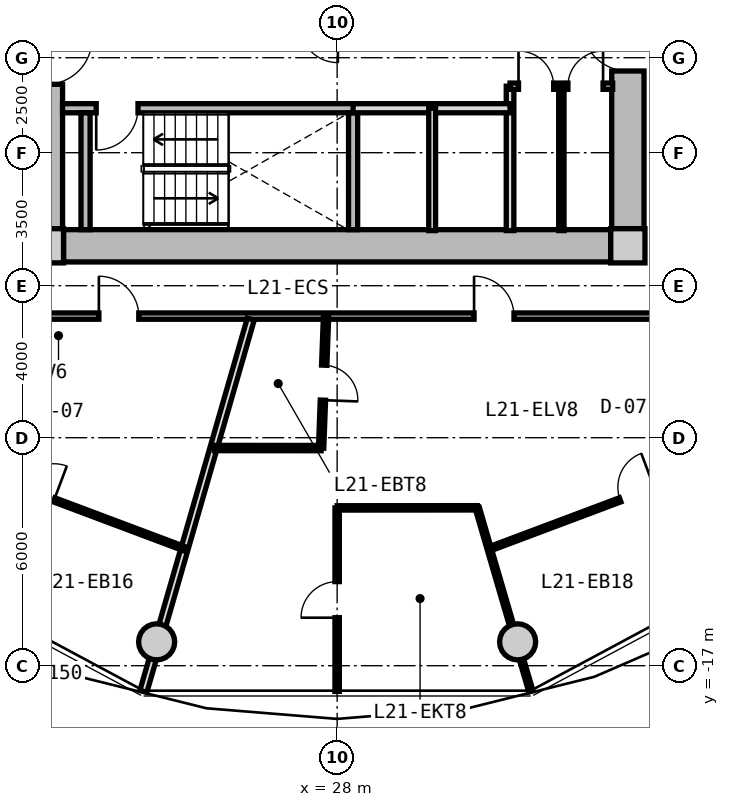
"""IFC4 building model, lengths in metres.
Left out: names, types, materials, properties, quantities, classifications, styles, units other than length and angle.
Written with IfcOpenShell. Run it as: python <this file> out.ifc"""

import sys

from ifc_helpers import new_model, si_unit, direction, frame, frame_2d, origin, origin_2d, place, context, subcontext, project, spatial, rectangle, circle, extrude, source, transform, mapped, element, fill, save


model = new_model("IFC4")
c1 = context("Model", 3, precision=1e-05, world=origin(), true_north=direction((0.0, 1.0)))
c2 = subcontext(c1, "Body", "Model", "MODEL_VIEW")
j1 = project(units=[si_unit("LENGTHUNIT", "METRE"), si_unit("PLANEANGLEUNIT", "RADIAN")], contexts=[c1])
p1 = place(None, origin())
s1 = spatial("IfcSite", under=j1, at=p1, CompositionType="ELEMENT")
p2 = place(p1, origin())
s2 = spatial("IfcBuilding", under=s1, at=p2, CompositionType="ELEMENT")
p3 = place(p2, frame((0.0, 0.0, 70.4)))
s3 = spatial("IfcBuildingStorey", under=s2, at=p3, CompositionType="ELEMENT", Elevation=70.4)
m1 = source(origin(), c2, "Body", "SweptSolid", [
    extrude(rectangle(XDim=0.9, YDim=0.9, at=origin_2d()), origin(), (0.0, 0.0, 1.0), 3.05),
])
for number, where, z_axis, x_axis in (
    (1, (20.35, -5.95, 0.0), (0.0, 0.0, 1.0), (1.0, 0.0, 0.0)),
    (2, (35.65, -5.95, 0.0), (0.0, 0.0, 1.0), (1.0, 0.0, 0.0)),
):
    element("IfcColumn", number, at=place(p3, frame(where, z_axis=z_axis, x_axis=x_axis)), inside=s3, PredefinedType="COLUMN", context=c2, shape_type="MappedRepresentation", body=[
        mapped(m1, transform((0.0, 0.0, 0.0), x_axis=(1.0, 0.0, 0.0), y_axis=(0.0, 1.0, 0.0), z_axis=(0.0, 0.0, 1.0), scale=1.0)),
    ])
m2 = source(origin(), c2, "Body", "SweptSolid", [
    extrude(rectangle(XDim=14.4, YDim=0.85, at=frame_2d((7.2, 0.0))), origin(), (0.0, 0.0, 1.0), 2.73),
])
p4 = place(p3, frame((35.2, -5.95, 0.0), z_axis=(0.0, 0.0, 1.0), x_axis=(-1.0, 0.0, 0.0)))
e3 = element("IfcWall", 3, at=p4, inside=s3, PredefinedType="SHEAR", context=c2, shape_type="MappedRepresentation", body=[
    mapped(m2, transform((0.0, 0.0, 0.0), x_axis=(1.0, 0.0, 0.0), y_axis=(0.0, 1.0, 0.0), z_axis=(0.0, 0.0, 1.0), scale=1.0)),
])
m3 = source(origin(), c2, "Body", "SweptSolid", [
    extrude(rectangle(XDim=11.0, YDim=0.85, at=frame_2d((5.5, 0.0))), origin(), (0.0, 0.0, 1.0), 2.73),
])
p5 = place(p3, frame((20.35, -5.5, 0.0), z_axis=(0.0, 0.0, 1.0), x_axis=(0.0, 1.0, 0.0)))
e4 = element("IfcWall", 4, at=p5, inside=s3, PredefinedType="SHEAR", context=c2, shape_type="MappedRepresentation", body=[
    mapped(m3, transform((0.0, 0.0, 0.0), x_axis=(1.0, 0.0, 0.0), y_axis=(0.0, 1.0, 0.0), z_axis=(0.0, 0.0, 1.0), scale=1.0)),
])
p6 = place(p5, frame((3.8, 0.0, 0.0)))
e5 = element("IfcOpeningElement", 5, at=p6, cuts=e4, PredefinedType="OPENING", context=c2, shape_type="SweptSolid", body=[
    extrude(rectangle(XDim=1.2, YDim=2.15, at=frame_2d((0.6, 1.075))), frame((0.0, 0.435, 0.0), z_axis=(0.0, -1.0, 0.0), x_axis=(1.0, 0.0, 0.0)), (0.0, 0.0, 1.0), 0.87),
])
p7 = place(p3, frame((35.65, 5.5, 0.0), z_axis=(0.0, 0.0, 1.0), x_axis=(0.0, -1.0, 0.0)))
e6 = element("IfcWall", 6, at=p7, inside=s3, PredefinedType="SHEAR", context=c2, shape_type="MappedRepresentation", body=[
    mapped(m3, transform((0.0, 0.0, 0.0), x_axis=(1.0, 0.0, 0.0), y_axis=(0.0, 1.0, 0.0), z_axis=(0.0, 0.0, 1.0), scale=1.0)),
])
p8 = place(p7, frame((5.65, 0.0, 0.0)))
e7 = element("IfcOpeningElement", 7, at=p8, cuts=e6, PredefinedType="OPENING", context=c2, shape_type="SweptSolid", body=[
    extrude(rectangle(XDim=1.2, YDim=2.15, at=frame_2d((0.6, 1.075))), frame((0.0, 0.435, 0.0), z_axis=(0.0, -1.0, 0.0), x_axis=(1.0, 0.0, 0.0)), (0.0, 0.0, 1.0), 0.87),
])
m4 = source(origin(), c2, "Body", "SweptSolid", [
    extrude(circle(Radius=0.475, at=origin_2d()), origin(), (0.0, 0.0, 1.0), 3.05),
])
for number, where, z_axis, x_axis in (
    (8, (23.251, -16.373, 0.0), (0.0, 0.0, 1.0), (1.0, 0.0, 0.0)),
    (9, (32.749, -16.373, 0.0), (0.0, 0.0, 1.0), (1.0, 0.0, 0.0)),
):
    element("IfcColumn", number, at=place(p3, frame(where, z_axis=z_axis, x_axis=x_axis)), inside=s3, PredefinedType="COLUMN", context=c2, shape_type="MappedRepresentation", body=[
        mapped(m4, transform((0.0, 0.0, 0.0), x_axis=(1.0, 0.0, 0.0), y_axis=(0.0, 1.0, 0.0), z_axis=(0.0, 0.0, 1.0), scale=1.0)),
    ])
m5 = source(origin(), c2, "Body", "SweptSolid", [
    extrude(rectangle(XDim=7.765, YDim=0.24, at=frame_2d((3.883, 0.0))), origin(), (0.0, 0.0, 1.0), 2.73),
])
p9 = place(p3, frame((20.775, -2.33, 0.0), z_axis=(0.0, 0.0, 1.0), x_axis=(1.0, 0.0, 0.0)))
e10 = element("IfcWall", 10, at=p9, inside=s3, PredefinedType="PARTITIONING", context=c2, shape_type="MappedRepresentation", body=[
    mapped(m5, transform((0.0, 0.0, 0.0), x_axis=(1.0, 0.0, 0.0), y_axis=(0.0, 1.0, 0.0), z_axis=(0.0, 0.0, 1.0), scale=1.0)),
])
p10 = place(p9, frame((0.885, 0.0, 0.0)))
e11 = element("IfcOpeningElement", 11, at=p10, cuts=e10, PredefinedType="OPENING", context=c2, shape_type="SweptSolid", body=[
    extrude(rectangle(XDim=1.1, YDim=2.15, at=frame_2d((0.55, 1.075))), frame((0.0, 0.13, 0.0), z_axis=(0.0, -1.0, 0.0), x_axis=(1.0, 0.0, 0.0)), (0.0, 0.0, 1.0), 0.26),
])
m6 = source(origin(), c2, "Body", "SweptSolid", [
    extrude(rectangle(XDim=3.075, YDim=0.24, at=frame_2d((1.538, 0.0))), origin(), (0.0, 0.0, 1.0), 2.73),
])
for number, where, z_axis, x_axis in (
    (12, (21.38, -5.525, 0.0), (0.0, 0.0, 1.0), (0.0, 1.0, 0.0)),
    (13, (28.42, -5.525, 0.0), (0.0, 0.0, 1.0), (0.0, 1.0, 0.0)),
):
    element("IfcWall", number, at=place(p3, frame(where, z_axis=z_axis, x_axis=x_axis)), inside=s3, PredefinedType="PARTITIONING", context=c2, shape_type="MappedRepresentation", body=[
        mapped(m6, transform((0.0, 0.0, 0.0), x_axis=(1.0, 0.0, 0.0), y_axis=(0.0, 1.0, 0.0), z_axis=(0.0, 0.0, 1.0), scale=1.0)),
    ])
m7 = source(origin(), c2, "Body", "SweptSolid", [
    extrude(rectangle(XDim=3.8, YDim=0.2, at=frame_2d((1.9, 0.0))), origin(), (0.0, 0.0, 1.0), 2.715),
])
p11 = place(p3, frame((32.55, -5.55, 0.0), z_axis=(0.0, 0.0, 1.0), x_axis=(0.0, 1.0, 0.0)))
e14 = element("IfcWall", 14, at=p11, inside=s3, PredefinedType="PARTITIONING", context=c2, shape_type="MappedRepresentation", body=[
    mapped(m7, transform((0.0, 0.0, 0.0), x_axis=(1.0, 0.0, 0.0), y_axis=(0.0, 1.0, 0.0), z_axis=(0.0, 0.0, 1.0), scale=1.0)),
])
m8 = source(origin(), c2, "Body", "SweptSolid", [
    extrude(rectangle(XDim=4.13, YDim=0.24, at=frame_2d((2.065, 0.0))), origin(), (0.0, 0.0, 1.0), 2.715),
])
p12 = place(p3, frame((28.42, -2.33, 0.0), z_axis=(0.0, 0.0, 1.0), x_axis=(1.0, 0.0, 0.0)))
e15 = element("IfcWall", 15, at=p12, inside=s3, PredefinedType="PARTITIONING", context=c2, shape_type="MappedRepresentation", body=[
    mapped(m8, transform((0.0, 0.0, 0.0), x_axis=(1.0, 0.0, 0.0), y_axis=(0.0, 1.0, 0.0), z_axis=(0.0, 0.0, 1.0), scale=1.0)),
])
m9 = source(origin(), c2, "Body", "SweptSolid", [
    extrude(rectangle(XDim=3.22, YDim=0.18, at=frame_2d((1.61, 0.0))), origin(), (0.0, 0.0, 1.0), 2.715),
])
p13 = place(p3, frame((30.5, -5.55, 0.0), z_axis=(0.0, 0.0, 1.0), x_axis=(0.0, 1.0, 0.0)))
e16 = element("IfcWall", 16, at=p13, inside=s3, PredefinedType="PARTITIONING", context=c2, shape_type="MappedRepresentation", body=[
    mapped(m9, transform((0.0, 0.0, 0.0), x_axis=(1.0, 0.0, 0.0), y_axis=(0.0, 1.0, 0.0), z_axis=(0.0, 0.0, 1.0), scale=1.0)),
])
m10 = source(origin(), c2, "Body", "SweptSolid", [
    extrude(rectangle(XDim=2.7, YDim=0.165, at=frame_2d((1.35, 0.0))), origin(), (0.0, 0.0, 1.0), 2.715),
])
p14 = place(p3, frame((32.55, -1.75, 0.0), z_axis=(0.0, 0.0, 1.0), x_axis=(1.0, 0.0, 0.0)))
e17 = element("IfcWall", 17, at=p14, inside=s3, PredefinedType="PARTITIONING", context=c2, shape_type="MappedRepresentation", body=[
    mapped(m10, transform((0.0, 0.0, 0.0), x_axis=(1.0, 0.0, 0.0), y_axis=(0.0, 1.0, 0.0), z_axis=(0.0, 0.0, 1.0), scale=1.0)),
])
p15 = place(p14, frame((0.222, 0.0, 0.0)))
e18 = element("IfcOpeningElement", 18, at=p15, cuts=e17, PredefinedType="OPENING", context=c2, shape_type="SweptSolid", body=[
    extrude(rectangle(XDim=0.925, YDim=2.1, at=frame_2d((0.462, 1.05))), frame((0.0, 0.093, 0.0), z_axis=(0.0, -1.0, 0.0), x_axis=(1.0, 0.0, 0.0)), (0.0, 0.0, 1.0), 0.185),
])
p16 = place(p14, frame((1.522, 0.0, 0.0)))
e19 = element("IfcOpeningElement", 19, at=p16, cuts=e17, PredefinedType="OPENING", context=c2, shape_type="SweptSolid", body=[
    extrude(rectangle(XDim=0.925, YDim=2.1, at=frame_2d((0.462, 1.05))), frame((0.0, 0.093, 0.0), z_axis=(0.0, -1.0, 0.0), x_axis=(1.0, 0.0, 0.0)), (0.0, 0.0, 1.0), 0.185),
])
m11 = source(origin(), c2, "Body", "SweptSolid", [
    extrude(rectangle(XDim=3.8, YDim=0.14, at=frame_2d((1.9, 0.0))), origin(), (0.0, 0.0, 1.0), 2.715),
])
p17 = place(p3, frame((33.9, -5.55, 0.0), z_axis=(0.0, 0.0, 1.0), x_axis=(0.0, 1.0, 0.0)))
e20 = element("IfcWall", 20, at=p17, inside=s3, PredefinedType="PARTITIONING", context=c2, shape_type="MappedRepresentation", body=[
    mapped(m11, transform((0.0, 0.0, 0.0), x_axis=(1.0, 0.0, 0.0), y_axis=(0.0, 1.0, 0.0), z_axis=(0.0, 0.0, 1.0), scale=1.0)),
])
m12 = source(origin(), c2, "Body", "SweptSolid", [
    extrude(rectangle(XDim=19.0, YDim=0.165, at=frame_2d((9.5, 0.0))), origin(), (0.0, 0.0, 1.0), 2.715),
])
p18 = place(p3, frame((37.5, -7.8, 0.0), z_axis=(0.0, 0.0, 1.0), x_axis=(-1.0, 0.0, 0.0)))
e21 = element("IfcWall", 21, at=p18, inside=s3, PredefinedType="PARTITIONING", context=c2, shape_type="MappedRepresentation", body=[
    mapped(m12, transform((0.0, 0.0, 0.0), x_axis=(1.0, 0.0, 0.0), y_axis=(0.0, 1.0, 0.0), z_axis=(0.0, 0.0, 1.0), scale=1.0)),
])
p19 = place(p18, frame((14.72, 0.0, 0.0)))
e22 = element("IfcOpeningElement", 22, at=p19, cuts=e21, PredefinedType="OPENING", context=c2, shape_type="SweptSolid", body=[
    extrude(rectangle(XDim=1.05, YDim=2.15, at=frame_2d((0.525, 1.075))), frame((0.0, 0.093, 0.0), z_axis=(0.0, -1.0, 0.0), x_axis=(1.0, 0.0, 0.0)), (0.0, 0.0, 1.0), 0.185),
])
p20 = place(p18, frame((4.847, 0.0, 0.0)))
e23 = element("IfcOpeningElement", 23, at=p20, cuts=e21, PredefinedType="OPENING", context=c2, shape_type="SweptSolid", body=[
    extrude(rectangle(XDim=1.05, YDim=2.15, at=frame_2d((0.525, 1.075))), frame((0.0, 0.093, 0.0), z_axis=(0.0, -1.0, 0.0), x_axis=(1.0, 0.0, 0.0)), (0.0, 0.0, 1.0), 0.185),
])
m13 = source(origin(), c2, "Body", "SweptSolid", [
    extrude(rectangle(XDim=10.196, YDim=0.19, at=frame_2d((5.098, 0.0))), origin(), (0.0, 0.0, 1.0), 2.165),
])
p21 = place(p3, frame((25.727, -7.88, 0.0), z_axis=(0.0, 0.0, 1.0), x_axis=(-0.277136420347, -0.960830580549, 0.0)))
e24 = element("IfcWall", 24, at=p21, inside=s3, PredefinedType="PARTITIONING", context=c2, shape_type="MappedRepresentation", body=[
    mapped(m13, transform((0.0, 0.0, 0.0), x_axis=(1.0, 0.0, 0.0), y_axis=(0.0, 1.0, 0.0), z_axis=(0.0, 0.0, 1.0), scale=1.0)),
])
m14 = source(origin(), c2, "Body", "SweptSolid", [
    extrude(rectangle(XDim=8.32, YDim=0.115, at=frame_2d((4.16, 0.0))), origin(), (0.0, 0.0, 1.0), 2.715),
])
p22 = place(p3, frame((16.214, -11.006, 0.0), z_axis=(0.0, 0.0, 1.0), x_axis=(0.936180763098, -0.351518959382, 0.0)))
e25 = element("IfcWall", 25, at=p22, inside=s3, PredefinedType="PARTITIONING", context=c2, shape_type="MappedRepresentation", body=[
    mapped(m14, transform((0.0, 0.0, 0.0), x_axis=(1.0, 0.0, 0.0), y_axis=(0.0, 1.0, 0.0), z_axis=(0.0, 0.0, 1.0), scale=1.0)),
])
p23 = place(p22, frame((3.685, 0.0, 0.0)))
e26 = element("IfcOpeningElement", 26, at=p23, cuts=e25, PredefinedType="OPENING", context=c2, shape_type="SweptSolid", body=[
    extrude(rectangle(XDim=0.95, YDim=2.1, at=frame_2d((0.475, 1.05))), frame((0.0, 0.067, 0.0), z_axis=(0.0, -1.0, 0.0), x_axis=(1.0, 0.0, 0.0)), (0.0, 0.0, 1.0), 0.135),
])
p24 = place(p3, frame((31.997, -13.93, 0.0), z_axis=(0.0, 0.0, 1.0), x_axis=(0.936180763098, 0.351518959382, 0.0)))
e27 = element("IfcWall", 27, at=p24, inside=s3, PredefinedType="PARTITIONING", context=c2, shape_type="MappedRepresentation", body=[
    mapped(m14, transform((0.0, 0.0, 0.0), x_axis=(1.0, 0.0, 0.0), y_axis=(0.0, 1.0, 0.0), z_axis=(0.0, 0.0, 1.0), scale=1.0)),
])
p25 = place(p24, frame((3.685, 0.0, 0.0)))
e28 = element("IfcOpeningElement", 28, at=p25, cuts=e27, PredefinedType="OPENING", context=c2, shape_type="SweptSolid", body=[
    extrude(rectangle(XDim=0.95, YDim=2.1, at=frame_2d((0.475, 1.05))), frame((0.0, 0.067, 0.0), z_axis=(0.0, -1.0, 0.0), x_axis=(1.0, 0.0, 0.0)), (0.0, 0.0, 1.0), 0.135),
])
m15 = source(origin(), c2, "Body", "SweptSolid", [
    extrude(rectangle(XDim=5.031, YDim=0.115, at=frame_2d((2.515, 0.0))), origin(), (0.0, 0.0, 1.0), 2.165),
])
p26 = place(p3, frame((31.687, -12.848, 0.0), z_axis=(0.0, 0.0, 1.0), x_axis=(0.280657788738, -0.959807900374, 0.0)))
e29 = element("IfcWall", 29, at=p26, inside=s3, PredefinedType="PARTITIONING", context=c2, shape_type="MappedRepresentation", body=[
    mapped(m15, transform((0.0, 0.0, 0.0), x_axis=(1.0, 0.0, 0.0), y_axis=(0.0, 1.0, 0.0), z_axis=(0.0, 0.0, 1.0), scale=1.0)),
])
m16 = source(origin(), c2, "Body", "SweptSolid", [
    extrude(rectangle(XDim=3.446, YDim=0.14, at=frame_2d((1.723, 0.0))), origin(), (0.0, 0.0, 1.0), 2.715),
])
p27 = place(p3, frame((27.707, -7.83, 0.0), z_axis=(0.0, 0.0, 1.0), x_axis=(-0.037409983043, -0.999300001585, 0.0)))
e30 = element("IfcWall", 30, at=p27, inside=s3, PredefinedType="PARTITIONING", context=c2, shape_type="MappedRepresentation", body=[
    mapped(m16, transform((0.0, 0.0, 0.0), x_axis=(1.0, 0.0, 0.0), y_axis=(0.0, 1.0, 0.0), z_axis=(0.0, 0.0, 1.0), scale=1.0)),
])
p28 = place(p27, frame((1.263, 0.0, 0.0)))
e31 = element("IfcOpeningElement", 31, at=p28, cuts=e30, PredefinedType="OPENING", context=c2, shape_type="SweptSolid", body=[
    extrude(rectangle(XDim=0.92, YDim=2.1, at=frame_2d((0.46, 1.05))), frame((0.0, 0.08, 0.0), z_axis=(0.0, -1.0, 0.0), x_axis=(1.0, 0.0, 0.0)), (0.0, 0.0, 1.0), 0.16),
])
m17 = source(origin(), c2, "Body", "SweptSolid", [
    extrude(rectangle(XDim=2.813, YDim=0.14, at=frame_2d((1.406, 0.0))), origin(), (0.0, 0.0, 1.0), 2.715),
])
p29 = place(p3, frame((27.578, -11.273, 0.0), z_axis=(0.0, 0.0, 1.0), x_axis=(-0.99999981542, 0.000607586035, 0.0)))
e32 = element("IfcWall", 32, at=p29, inside=s3, PredefinedType="PARTITIONING", context=c2, shape_type="MappedRepresentation", body=[
    mapped(m17, transform((0.0, 0.0, 0.0), x_axis=(1.0, 0.0, 0.0), y_axis=(0.0, 1.0, 0.0), z_axis=(0.0, 0.0, 1.0), scale=1.0)),
])
m18 = source(origin(), c2, "Body", "SweptSolid", [
    extrude(rectangle(XDim=4.829, YDim=0.115, at=frame_2d((2.415, 0.0))), origin(), (0.0, 0.0, 1.0), 2.715),
])
p30 = place(p3, frame((28.0, -12.848, 0.0), z_axis=(0.0, 0.0, 1.0), x_axis=(0.0, -1.0, 0.0)))
e33 = element("IfcWall", 33, at=p30, inside=s3, PredefinedType="PARTITIONING", context=c2, shape_type="MappedRepresentation", body=[
    mapped(m18, transform((0.0, 0.0, 0.0), x_axis=(1.0, 0.0, 0.0), y_axis=(0.0, 1.0, 0.0), z_axis=(0.0, 0.0, 1.0), scale=1.0)),
])
p31 = place(p30, frame((1.939, 0.0, 0.0)))
e34 = element("IfcOpeningElement", 34, at=p31, cuts=e33, PredefinedType="OPENING", context=c2, shape_type="SweptSolid", body=[
    extrude(rectangle(XDim=0.95, YDim=2.1, at=frame_2d((0.475, 1.05))), frame((0.0, 0.067, 0.0), z_axis=(0.0, -1.0, 0.0), x_axis=(1.0, 0.0, 0.0)), (0.0, 0.0, 1.0), 0.135),
])
m19 = source(origin(), c2, "Body", "SweptSolid", [
    extrude(rectangle(XDim=3.686, YDim=0.115, at=frame_2d((1.843, 0.0))), origin(), (0.0, 0.0, 1.0), 2.715),
])
p32 = place(p3, frame((28.0, -12.848, 0.0), z_axis=(0.0, 0.0, 1.0), x_axis=(0.999999780653, 0.000662339237, 0.0)))
e35 = element("IfcWall", 35, at=p32, inside=s3, PredefinedType="PARTITIONING", context=c2, shape_type="MappedRepresentation", body=[
    mapped(m19, transform((0.0, 0.0, 0.0), x_axis=(1.0, 0.0, 0.0), y_axis=(0.0, 1.0, 0.0), z_axis=(0.0, 0.0, 1.0), scale=1.0)),
])
m20 = source(origin(), c2, "Body", "SweptSolid", [
    extrude(rectangle(XDim=1.1, YDim=2.15, at=frame_2d((0.55, 1.075))), frame((0.0, 0.025, 0.0), z_axis=(0.0, -1.0, 0.0), x_axis=(1.0, 0.0, 0.0)), (0.0, 0.0, 1.0), 0.05),
])
p33 = place(p10, frame((1.1, 0.0, 0.0), z_axis=(0.0, 0.0, 1.0), x_axis=(-1.0, 0.0, 0.0)))
e36 = element("IfcDoor", 36, at=p33, inside=s3, OperationType="SINGLE_SWING_RIGHT", PredefinedType="DOOR", context=c2, shape_type="MappedRepresentation", body=[
    mapped(m20, transform((0.0, 0.0, 0.0), x_axis=(1.0, 0.0, 0.0), y_axis=(0.0, 1.0, 0.0), z_axis=(0.0, 0.0, 1.0), scale=1.0)),
])
fill(e11, e36)
m21 = source(origin(), c2, "Body", "SweptSolid", [
    extrude(rectangle(XDim=1.2, YDim=2.15, at=frame_2d((0.6, 1.075))), frame((0.0, 0.025, 0.0), z_axis=(0.0, -1.0, 0.0), x_axis=(1.0, 0.0, 0.0)), (0.0, 0.0, 1.0), 0.05),
])
p34 = place(p8, frame((1.2, 0.0, 0.0), z_axis=(0.0, 0.0, 1.0), x_axis=(-1.0, 0.0, 0.0)))
e37 = element("IfcDoor", 37, at=p34, inside=s3, OperationType="SINGLE_SWING_RIGHT", PredefinedType="DOOR", context=c2, shape_type="MappedRepresentation", body=[
    mapped(m21, transform((0.0, 0.0, 0.0), x_axis=(1.0, 0.0, 0.0), y_axis=(0.0, 1.0, 0.0), z_axis=(0.0, 0.0, 1.0), scale=1.0)),
])
fill(e7, e37)
m22 = source(origin(), c2, "Body", "SweptSolid", [
    extrude(rectangle(XDim=0.925, YDim=2.1, at=frame_2d((0.462, 1.05))), frame((0.0, 0.025, 0.0), z_axis=(0.0, -1.0, 0.0), x_axis=(1.0, 0.0, 0.0)), (0.0, 0.0, 1.0), 0.05),
])
p35 = place(p15, origin())
e38 = element("IfcDoor", 38, at=p35, inside=s3, OperationType="SINGLE_SWING_LEFT", PredefinedType="DOOR", context=c2, shape_type="MappedRepresentation", body=[
    mapped(m22, transform((0.0, 0.0, 0.0), x_axis=(1.0, 0.0, 0.0), y_axis=(0.0, 1.0, 0.0), z_axis=(0.0, 0.0, 1.0), scale=1.0)),
])
fill(e18, e38)
p36 = place(p16, origin())
e39 = element("IfcDoor", 39, at=p36, inside=s3, OperationType="SINGLE_SWING_RIGHT", PredefinedType="DOOR", context=c2, shape_type="MappedRepresentation", body=[
    mapped(m22, transform((0.0, 0.0, 0.0), x_axis=(1.0, 0.0, 0.0), y_axis=(0.0, 1.0, 0.0), z_axis=(0.0, 0.0, 1.0), scale=1.0)),
])
fill(e19, e39)
m23 = source(origin(), c2, "Body", "SweptSolid", [
    extrude(rectangle(XDim=1.05, YDim=2.15, at=frame_2d((0.525, 1.075))), frame((0.0, 0.025, 0.0), z_axis=(0.0, -1.0, 0.0), x_axis=(1.0, 0.0, 0.0)), (0.0, 0.0, 1.0), 0.05),
])
p37 = place(p19, frame((1.05, 0.0, 0.0), z_axis=(0.0, 0.0, 1.0), x_axis=(-1.0, 0.0, 0.0)))
e40 = element("IfcDoor", 40, at=p37, inside=s3, OperationType="SINGLE_SWING_LEFT", PredefinedType="DOOR", context=c2, shape_type="MappedRepresentation", body=[
    mapped(m23, transform((0.0, 0.0, 0.0), x_axis=(1.0, 0.0, 0.0), y_axis=(0.0, 1.0, 0.0), z_axis=(0.0, 0.0, 1.0), scale=1.0)),
])
fill(e22, e40)
m24 = source(origin(), c2, "Body", "SweptSolid", [
    extrude(rectangle(XDim=0.95, YDim=2.1, at=frame_2d((0.475, 1.05))), frame((0.0, 0.025, 0.0), z_axis=(0.0, -1.0, 0.0), x_axis=(1.0, 0.0, 0.0)), (0.0, 0.0, 1.0), 0.05),
])
p38 = place(p23, origin())
e41 = element("IfcDoor", 41, at=p38, inside=s3, OperationType="SINGLE_SWING_RIGHT", PredefinedType="DOOR", context=c2, shape_type="MappedRepresentation", body=[
    mapped(m24, transform((0.0, 0.0, 0.0), x_axis=(1.0, 0.0, 0.0), y_axis=(0.0, 1.0, 0.0), z_axis=(0.0, 0.0, 1.0), scale=1.0)),
])
fill(e26, e41)
p39 = place(p20, frame((1.05, 0.0, 0.0), z_axis=(0.0, 0.0, 1.0), x_axis=(-1.0, 0.0, 0.0)))
e42 = element("IfcDoor", 42, at=p39, inside=s3, OperationType="SINGLE_SWING_LEFT", PredefinedType="DOOR", context=c2, shape_type="MappedRepresentation", body=[
    mapped(m23, transform((0.0, 0.0, 0.0), x_axis=(1.0, 0.0, 0.0), y_axis=(0.0, 1.0, 0.0), z_axis=(0.0, 0.0, 1.0), scale=1.0)),
])
fill(e23, e42)
m25 = source(origin(), c2, "Body", "SweptSolid", [
    extrude(rectangle(XDim=0.92, YDim=2.1, at=frame_2d((0.46, 1.05))), frame((0.0, 0.025, 0.0), z_axis=(0.0, -1.0, 0.0), x_axis=(1.0, 0.0, 0.0)), (0.0, 0.0, 1.0), 0.05),
])
p40 = place(p28, origin())
e43 = element("IfcDoor", 43, at=p40, inside=s3, OperationType="SINGLE_SWING_RIGHT", PredefinedType="DOOR", context=c2, shape_type="MappedRepresentation", body=[
    mapped(m25, transform((0.0, 0.0, 0.0), x_axis=(1.0, 0.0, 0.0), y_axis=(0.0, 1.0, 0.0), z_axis=(0.0, 0.0, 1.0), scale=1.0)),
])
fill(e31, e43)
p41 = place(p31, frame((0.95, 0.0, 0.0), z_axis=(0.0, 0.0, 1.0), x_axis=(-1.0, 0.0, 0.0)))
e44 = element("IfcDoor", 44, at=p41, inside=s3, OperationType="SINGLE_SWING_LEFT", PredefinedType="DOOR", context=c2, shape_type="MappedRepresentation", body=[
    mapped(m24, transform((0.0, 0.0, 0.0), x_axis=(1.0, 0.0, 0.0), y_axis=(0.0, 1.0, 0.0), z_axis=(0.0, 0.0, 1.0), scale=1.0)),
])
fill(e34, e44)
p42 = place(p25, origin())
e45 = element("IfcDoor", 45, at=p42, inside=s3, OperationType="SINGLE_SWING_RIGHT", PredefinedType="DOOR", context=c2, shape_type="MappedRepresentation", body=[
    mapped(m24, transform((0.0, 0.0, 0.0), x_axis=(1.0, 0.0, 0.0), y_axis=(0.0, 1.0, 0.0), z_axis=(0.0, 0.0, 1.0), scale=1.0)),
])
fill(e28, e45)
save(model, sys.argv[1])
